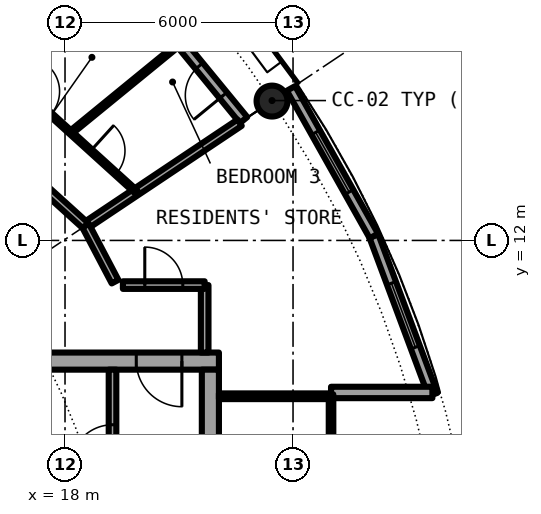
"""IFC4 building model, lengths in metres.
Left out: names, types, materials, properties, quantities, classifications, styles, units other than length and angle.
Written with IfcOpenShell. Run it as: python <this file> out.ifc"""

import sys

from ifc_helpers import new_model, si_unit, direction, frame, frame_2d, origin, origin_2d, place, context, subcontext, project, spatial, rectangle, hollow_circle, extrude, element, fill, save


model = new_model("IFC4")
c1 = context("Model", 3, precision=1e-05, world=origin(), true_north=direction((0.0, 1.0)))
c2 = subcontext(c1, "Body", "Model", "MODEL_VIEW")
j1 = project(units=[si_unit("LENGTHUNIT", "METRE"), si_unit("PLANEANGLEUNIT", "RADIAN")], contexts=[c1])
p1 = place(None, origin())
s1 = spatial("IfcSite", under=j1, at=p1, CompositionType="ELEMENT")
p2 = place(p1, origin())
s2 = spatial("IfcBuilding", under=s1, at=p2, CompositionType="ELEMENT")
p3 = place(p2, frame((0.0, 0.0, 196.3)))
s3 = spatial("IfcBuildingStorey", under=s2, at=p3, CompositionType="ELEMENT", Elevation=196.3)
p4 = place(p3, frame((23.448, 15.667, 0.0), z_axis=(0.0, 0.0, 1.0), x_axis=(1.0, 0.0, 0.0)))
e1 = element("IfcColumn", 1, at=p4, inside=s3, PredefinedType="COLUMN", context=c2, shape_type="SweptSolid", body=[
    extrude(hollow_circle(Radius=0.406, WallThickness=0.03, at=origin_2d()), origin(), (0.0, 0.0, 1.0), 3.05),
])
p5 = place(p3, frame((22.699, 15.167, 0.0), z_axis=(0.0, 0.0, 1.0), x_axis=(-0.634382322723, 0.773019449054, 0.0)))
e2 = element("IfcWall", 2, at=p5, inside=s3, PredefinedType="SOLIDWALL", context=c2, shape_type="SweptSolid", body=[
    extrude(rectangle(XDim=5.352, YDim=0.25, at=frame_2d((2.676, 0.0))), origin(), (0.0, 0.0, 1.0), 2.7),
])
p6 = place(p5, frame((0.841, 0.0, 0.0)))
e3 = element("IfcOpeningElement", 3, at=p6, cuts=e2, PredefinedType="OPENING", context=c2, shape_type="SweptSolid", body=[
    extrude(rectangle(XDim=1.0, YDim=2.2, at=frame_2d((0.5, 1.1))), frame((0.0, 0.135, 0.0), z_axis=(0.0, -1.0, 0.0), x_axis=(1.0, 0.0, 0.0)), (0.0, 0.0, 1.0), 0.27),
])
p7 = place(p5, frame((3.111, 0.0, 0.3)))
e4 = element("IfcOpeningElement", 4, at=p7, cuts=e2, PredefinedType="OPENING", context=c2, shape_type="SweptSolid", body=[
    extrude(rectangle(XDim=1.8, YDim=2.1, at=frame_2d((0.9, 1.05))), frame((0.0, 0.135, 0.0), z_axis=(0.0, -1.0, 0.0), x_axis=(1.0, 0.0, 0.0)), (0.0, 0.0, 1.0), 0.27),
])
p8 = place(p3, frame((27.682, 7.945, 0.0), z_axis=(0.0, 0.0, 1.0), x_axis=(-0.349247811493, 0.937030397675, 0.0)))
e5 = element("IfcWall", 5, at=p8, inside=s3, PredefinedType="SOLIDWALL", context=c2, shape_type="SweptSolid", body=[
    extrude(rectangle(XDim=4.452, YDim=0.25, at=frame_2d((2.226, 0.0))), origin(), (0.0, 0.0, 1.0), 2.7),
])
p9 = place(p8, frame((1.327, 0.0, 0.3)))
e6 = element("IfcOpeningElement", 6, at=p9, cuts=e5, PredefinedType="OPENING", context=c2, shape_type="SweptSolid", body=[
    extrude(rectangle(XDim=1.8, YDim=2.1, at=frame_2d((0.9, 1.05))), frame((0.0, 0.135, 0.0), z_axis=(0.0, -1.0, 0.0), x_axis=(1.0, 0.0, 0.0)), (0.0, 0.0, 1.0), 0.27),
])
p10 = place(p3, frame((26.127, 12.117, 0.0), z_axis=(0.0, 0.0, 1.0), x_axis=(-0.489696356642, 0.871893042919, 0.0)))
e7 = element("IfcWall", 7, at=p10, inside=s3, PredefinedType="SOLIDWALL", context=c2, shape_type="SweptSolid", body=[
    extrude(rectangle(XDim=4.454, YDim=0.25, at=frame_2d((2.227, 0.0))), origin(), (0.0, 0.0, 1.0), 2.7),
])
p11 = place(p10, frame((1.327, 0.0, 0.3)))
e8 = element("IfcOpeningElement", 8, at=p11, cuts=e7, PredefinedType="OPENING", context=c2, shape_type="SweptSolid", body=[
    extrude(rectangle(XDim=1.8, YDim=2.1, at=frame_2d((0.9, 1.05))), frame((0.0, 0.135, 0.0), z_axis=(0.0, -1.0, 0.0), x_axis=(1.0, 0.0, 0.0)), (0.0, 0.0, 1.0), 0.27),
])
p12 = place(p3, frame((25.0, 8.0, 0.0), z_axis=(0.0, 0.0, 1.0), x_axis=(1.0, 0.0, 0.0)))
e9 = element("IfcWall", 9, at=p12, inside=s3, PredefinedType="SOLIDWALL", context=c2, shape_type="SweptSolid", body=[
    extrude(rectangle(XDim=2.667, YDim=0.3, at=frame_2d((1.333, 0.0))), origin(), (0.0, 0.0, 1.0), 2.7),
])
p13 = place(p3, frame((22.05, 8.825, 0.0), z_axis=(0.0, 0.0, 1.0), x_axis=(-1.0, 0.0, 0.0)))
e10 = element("IfcWall", 10, at=p13, inside=s3, PredefinedType="SHEAR", context=c2, shape_type="SweptSolid", body=[
    extrude(rectangle(XDim=13.5, YDim=0.45, at=frame_2d((6.75, 0.0))), origin(), (0.0, 0.0, 1.0), 3.05),
])
p14 = place(p13, frame((0.975, 0.0, 0.0)))
e11 = element("IfcOpeningElement", 11, at=p14, cuts=e10, PredefinedType="OPENING", context=c2, shape_type="SweptSolid", body=[
    extrude(rectangle(XDim=1.2, YDim=2.3, at=frame_2d((0.6, 1.15))), frame((0.0, 0.235, 0.0), z_axis=(0.0, -1.0, 0.0), x_axis=(1.0, 0.0, 0.0)), (0.0, 0.0, 1.0), 0.47),
])
p15 = place(p3, frame((21.825, 8.6, 0.0), z_axis=(0.0, 0.0, 1.0), x_axis=(0.0, -1.0, 0.0)))
e12 = element("IfcWall", 12, at=p15, inside=s3, PredefinedType="SHEAR", context=c2, shape_type="SweptSolid", body=[
    extrude(rectangle(XDim=17.2, YDim=0.45, at=frame_2d((8.6, 0.0))), origin(), (0.0, 0.0, 1.0), 3.05),
])
p16 = place(p15, frame((7.7, 0.0, 0.0)))
e13 = element("IfcOpeningElement", 13, at=p16, cuts=e12, PredefinedType="OPENING", context=c2, shape_type="SweptSolid", body=[
    extrude(rectangle(XDim=1.8, YDim=2.3, at=frame_2d((0.9, 1.15))), frame((0.0, 0.235, 0.0), z_axis=(0.0, -1.0, 0.0), x_axis=(1.0, 0.0, 0.0)), (0.0, 0.0, 1.0), 0.47),
])
p17 = place(p3, frame((19.25, 1.575, 0.0), z_axis=(0.0, 0.0, 1.0), x_axis=(0.0, 1.0, 0.0)))
e14 = element("IfcWall", 14, at=p17, inside=s3, PredefinedType="SOLIDWALL", context=c2, shape_type="SweptSolid", body=[
    extrude(rectangle(XDim=7.025, YDim=0.2, at=frame_2d((3.513, 0.0))), origin(), (0.0, 0.0, 1.0), 2.7),
])
p18 = place(p17, frame((4.475, 0.0, 0.0)))
e15 = element("IfcOpeningElement", 15, at=p18, cuts=e14, PredefinedType="OPENING", context=c2, shape_type="SweptSolid", body=[
    extrude(rectangle(XDim=1.1, YDim=2.3, at=frame_2d((0.55, 1.15))), frame((0.0, 0.11, 0.0), z_axis=(0.0, -1.0, 0.0), x_axis=(1.0, 0.0, 0.0)), (0.0, 0.0, 1.0), 0.22),
])
p19 = place(p3, frame((22.05, 7.9, 0.0), z_axis=(0.0, 0.0, 1.0), x_axis=(1.0, 0.0, 0.0)))
e16 = element("IfcWall", 16, at=p19, inside=s3, PredefinedType="PARTITIONING", context=c2, shape_type="SweptSolid", body=[
    extrude(rectangle(XDim=2.89, YDim=0.15, at=frame_2d((1.445, 0.0))), origin(), (0.0, 0.0, 1.0), 2.7),
])
p20 = place(p3, frame((25.0, -7.95, 0.0), z_axis=(0.0, 0.0, 1.0), x_axis=(0.0, 1.0, 0.0)))
e17 = element("IfcWall", 17, at=p20, inside=s3, PredefinedType="PARTITIONING", context=c2, shape_type="SweptSolid", body=[
    extrude(rectangle(XDim=15.9, YDim=0.12, at=frame_2d((7.95, 0.0))), origin(), (0.0, 0.0, 1.0), 2.7),
])
p21 = place(p20, frame((0.95, 0.0, 0.1)))
e18 = element("IfcOpeningElement", 18, at=p21, cuts=e17, PredefinedType="OPENING", context=c2, shape_type="SweptSolid", body=[
    extrude(rectangle(XDim=14.0, YDim=2.35, at=frame_2d((7.0, 1.175))), frame((0.0, 0.07, 0.0), z_axis=(0.0, -1.0, 0.0), x_axis=(1.0, 0.0, 0.0)), (0.0, 0.0, 1.0), 0.14),
])
p22 = place(p3, frame((21.675, 9.05, 0.0), z_axis=(0.0, 0.0, 1.0), x_axis=(0.0, 1.0, 0.0)))
e19 = element("IfcWall", 19, at=p22, inside=s3, PredefinedType="PARTITIONING", context=c2, shape_type="SweptSolid", body=[
    extrude(rectangle(XDim=1.775, YDim=0.2, at=frame_2d((0.887, 0.0))), origin(), (0.0, 0.0, 1.0), 2.7),
])
p23 = place(p3, frame((16.43, 16.398, 0.0), z_axis=(0.0, 0.0, 1.0), x_axis=(0.707722727509, 0.706490297858, 0.0)))
e20 = element("IfcWall", 20, at=p23, inside=s3, PredefinedType="PARTITIONING", context=c2, shape_type="SweptSolid", body=[
    extrude(rectangle(XDim=3.962, YDim=0.1, at=frame_2d((1.981, 0.0))), origin(), (0.0, 0.0, 1.0), 2.7),
])
p24 = place(p3, frame((18.151, 14.838, 0.0), z_axis=(0.0, 0.0, 1.0), x_axis=(0.774321581607, 0.63279229472, 0.0)))
e21 = element("IfcWall", 21, at=p24, inside=s3, PredefinedType="PARTITIONING", context=c2, shape_type="SweptSolid", body=[
    extrude(rectangle(XDim=3.731, YDim=0.1, at=frame_2d((1.866, 0.0))), origin(), (0.0, 0.0, 1.0), 2.7),
])
p25 = place(p3, frame((18.542, 12.389, 0.0), z_axis=(0.0, 0.0, 1.0), x_axis=(0.831387096605, 0.55569370664, 0.0)))
e22 = element("IfcWall", 22, at=p25, inside=s3, PredefinedType="PARTITIONING", context=c2, shape_type="SweptSolid", body=[
    extrude(rectangle(XDim=4.875, YDim=0.2, at=frame_2d((2.438, 0.0))), origin(), (0.0, 0.0, 1.0), 2.7),
])
p26 = place(p3, frame((19.523, 10.825, 0.0), z_axis=(0.0, 0.0, 1.0), x_axis=(1.0, 0.0, 0.0)))
e23 = element("IfcWall", 23, at=p26, inside=s3, PredefinedType="PARTITIONING", context=c2, shape_type="SweptSolid", body=[
    extrude(rectangle(XDim=2.152, YDim=0.2, at=frame_2d((1.076, 0.0))), origin(), (0.0, 0.0, 1.0), 2.7),
])
p27 = place(p26, frame((0.576, 0.0, 0.0)))
e24 = element("IfcOpeningElement", 24, at=p27, cuts=e23, PredefinedType="OPENING", context=c2, shape_type="SweptSolid", body=[
    extrude(rectangle(XDim=1.0, YDim=2.3, at=frame_2d((0.5, 1.15))), frame((0.0, 0.11, 0.0), z_axis=(0.0, -1.0, 0.0), x_axis=(1.0, 0.0, 0.0)), (0.0, 0.0, 1.0), 0.22),
])
p28 = place(p3, frame((10.512, 19.667, 0.0), z_axis=(0.0, 0.0, 1.0), x_axis=(0.740849323054, -0.67167125927, 0.0)))
e25 = element("IfcWall", 25, at=p28, inside=s3, PredefinedType="PARTITIONING", context=c2, shape_type="SweptSolid", body=[
    extrude(rectangle(XDim=10.842, YDim=0.2, at=frame_2d((5.421, 0.0))), origin(), (0.0, 0.0, 1.0), 2.7),
])
p29 = place(p28, frame((6.003, 0.0, 0.0)))
e26 = element("IfcOpeningElement", 26, at=p29, cuts=e25, PredefinedType="OPENING", context=c2, shape_type="SweptSolid", body=[
    extrude(rectangle(XDim=1.0, YDim=2.3, at=frame_2d((0.5, 1.15))), frame((0.0, 0.11, 0.0), z_axis=(0.0, -1.0, 0.0), x_axis=(1.0, 0.0, 0.0)), (0.0, 0.0, 1.0), 0.22),
])
p30 = place(p3, frame((18.542, 12.389, 0.0), z_axis=(0.0, 0.0, 1.0), x_axis=(0.465359652486, -0.885121683068, 0.0)))
e27 = element("IfcWall", 27, at=p30, inside=s3, PredefinedType="PARTITIONING", context=c2, shape_type="SweptSolid", body=[
    extrude(rectangle(XDim=1.665, YDim=0.2, at=frame_2d((0.833, 0.0))), origin(), (0.0, 0.0, 1.0), 2.7),
])
p31 = place(p3, frame((14.709, 17.958, 0.0), z_axis=(0.0, 0.0, 1.0), x_axis=(0.740923753351, -0.671589153962, 0.0)))
e28 = element("IfcWall", 28, at=p31, inside=s3, PredefinedType="PARTITIONING", context=c2, shape_type="SweptSolid", body=[
    extrude(rectangle(XDim=6.969, YDim=0.1, at=frame_2d((3.484, 0.0))), origin(), (0.0, 0.0, 1.0), 2.7),
])
p32 = place(p31, frame((3.034, 0.0, 0.0)))
e29 = element("IfcOpeningElement", 29, at=p32, cuts=e28, PredefinedType="OPENING", context=c2, shape_type="SweptSolid", body=[
    extrude(rectangle(XDim=0.9, YDim=2.3, at=frame_2d((0.45, 1.15))), frame((0.0, 0.06, 0.0), z_axis=(0.0, -1.0, 0.0), x_axis=(1.0, 0.0, 0.0)), (0.0, 0.0, 1.0), 0.12),
])
p33 = place(p31, frame((5.357, 0.0, 0.0)))
e30 = element("IfcOpeningElement", 30, at=p33, cuts=e28, PredefinedType="OPENING", context=c2, shape_type="SweptSolid", body=[
    extrude(rectangle(XDim=0.9, YDim=2.3, at=frame_2d((0.45, 1.15))), frame((0.0, 0.06, 0.0), z_axis=(0.0, -1.0, 0.0), x_axis=(1.0, 0.0, 0.0)), (0.0, 0.0, 1.0), 0.12),
])
p34 = place(p6, origin())
e31 = element("IfcDoor", 31, at=p34, inside=s3, OperationType="SINGLE_SWING_LEFT", PredefinedType="DOOR", context=c2, shape_type="SweptSolid", body=[
    extrude(rectangle(XDim=1.0, YDim=2.2, at=frame_2d((0.5, 1.1))), frame((0.0, 0.025, 0.0), z_axis=(0.0, -1.0, 0.0), x_axis=(1.0, 0.0, 0.0)), (0.0, 0.0, 1.0), 0.05),
])
fill(e3, e31)
p35 = place(p9, origin())
e32 = element("IfcWindow", 32, at=p35, inside=s3, PartitioningType="SINGLE_PANEL", PredefinedType="WINDOW", context=c2, shape_type="SweptSolid", body=[
    extrude(rectangle(XDim=1.8, YDim=2.1, at=frame_2d((0.9, 1.05))), frame((0.0, 0.03, 0.0), z_axis=(0.0, -1.0, 0.0), x_axis=(1.0, 0.0, 0.0)), (0.0, 0.0, 1.0), 0.06),
])
fill(e6, e32)
p36 = place(p11, origin())
e33 = element("IfcWindow", 33, at=p36, inside=s3, PartitioningType="SINGLE_PANEL", PredefinedType="WINDOW", context=c2, shape_type="SweptSolid", body=[
    extrude(rectangle(XDim=1.8, YDim=2.1, at=frame_2d((0.9, 1.05))), frame((0.0, 0.03, 0.0), z_axis=(0.0, -1.0, 0.0), x_axis=(1.0, 0.0, 0.0)), (0.0, 0.0, 1.0), 0.06),
])
fill(e8, e33)
p37 = place(p18, origin())
e34 = element("IfcDoor", 34, at=p37, inside=s3, OperationType="SINGLE_SWING_LEFT", PredefinedType="DOOR", context=c2, shape_type="SweptSolid", body=[
    extrude(rectangle(XDim=1.1, YDim=2.3, at=frame_2d((0.55, 1.15))), frame((0.0, 0.025, 0.0), z_axis=(0.0, -1.0, 0.0), x_axis=(1.0, 0.0, 0.0)), (0.0, 0.0, 1.0), 0.05),
])
fill(e15, e34)
p38 = place(p14, origin())
e35 = element("IfcDoor", 35, at=p38, inside=s3, OperationType="SINGLE_SWING_RIGHT", PredefinedType="DOOR", context=c2, shape_type="SweptSolid", body=[
    extrude(rectangle(XDim=1.2, YDim=2.3, at=frame_2d((0.6, 1.15))), frame((0.0, 0.025, 0.0), z_axis=(0.0, -1.0, 0.0), x_axis=(1.0, 0.0, 0.0)), (0.0, 0.0, 1.0), 0.05),
])
fill(e11, e35)
p39 = place(p21, origin())
e36 = element("IfcWindow", 36, at=p39, inside=s3, PartitioningType="SINGLE_PANEL", PredefinedType="WINDOW", context=c2, shape_type="SweptSolid", body=[
    extrude(rectangle(XDim=14.0, YDim=2.35, at=frame_2d((7.0, 1.175))), frame((0.0, 0.03, 0.0), z_axis=(0.0, -1.0, 0.0), x_axis=(1.0, 0.0, 0.0)), (0.0, 0.0, 1.0), 0.06),
])
fill(e18, e36)
p40 = place(p33, origin())
e37 = element("IfcDoor", 37, at=p40, inside=s3, OperationType="SINGLE_SWING_RIGHT", PredefinedType="DOOR", context=c2, shape_type="SweptSolid", body=[
    extrude(rectangle(XDim=0.9, YDim=2.3, at=frame_2d((0.45, 1.15))), frame((0.0, 0.025, 0.0), z_axis=(0.0, -1.0, 0.0), x_axis=(1.0, 0.0, 0.0)), (0.0, 0.0, 1.0), 0.05),
])
fill(e30, e37)
p41 = place(p27, origin())
e38 = element("IfcDoor", 38, at=p41, inside=s3, OperationType="SINGLE_SWING_LEFT", PredefinedType="DOOR", context=c2, shape_type="SweptSolid", body=[
    extrude(rectangle(XDim=1.0, YDim=2.3, at=frame_2d((0.5, 1.15))), frame((0.0, 0.025, 0.0), z_axis=(0.0, -1.0, 0.0), x_axis=(1.0, 0.0, 0.0)), (0.0, 0.0, 1.0), 0.05),
])
fill(e24, e38)
save(model, sys.argv[1])
